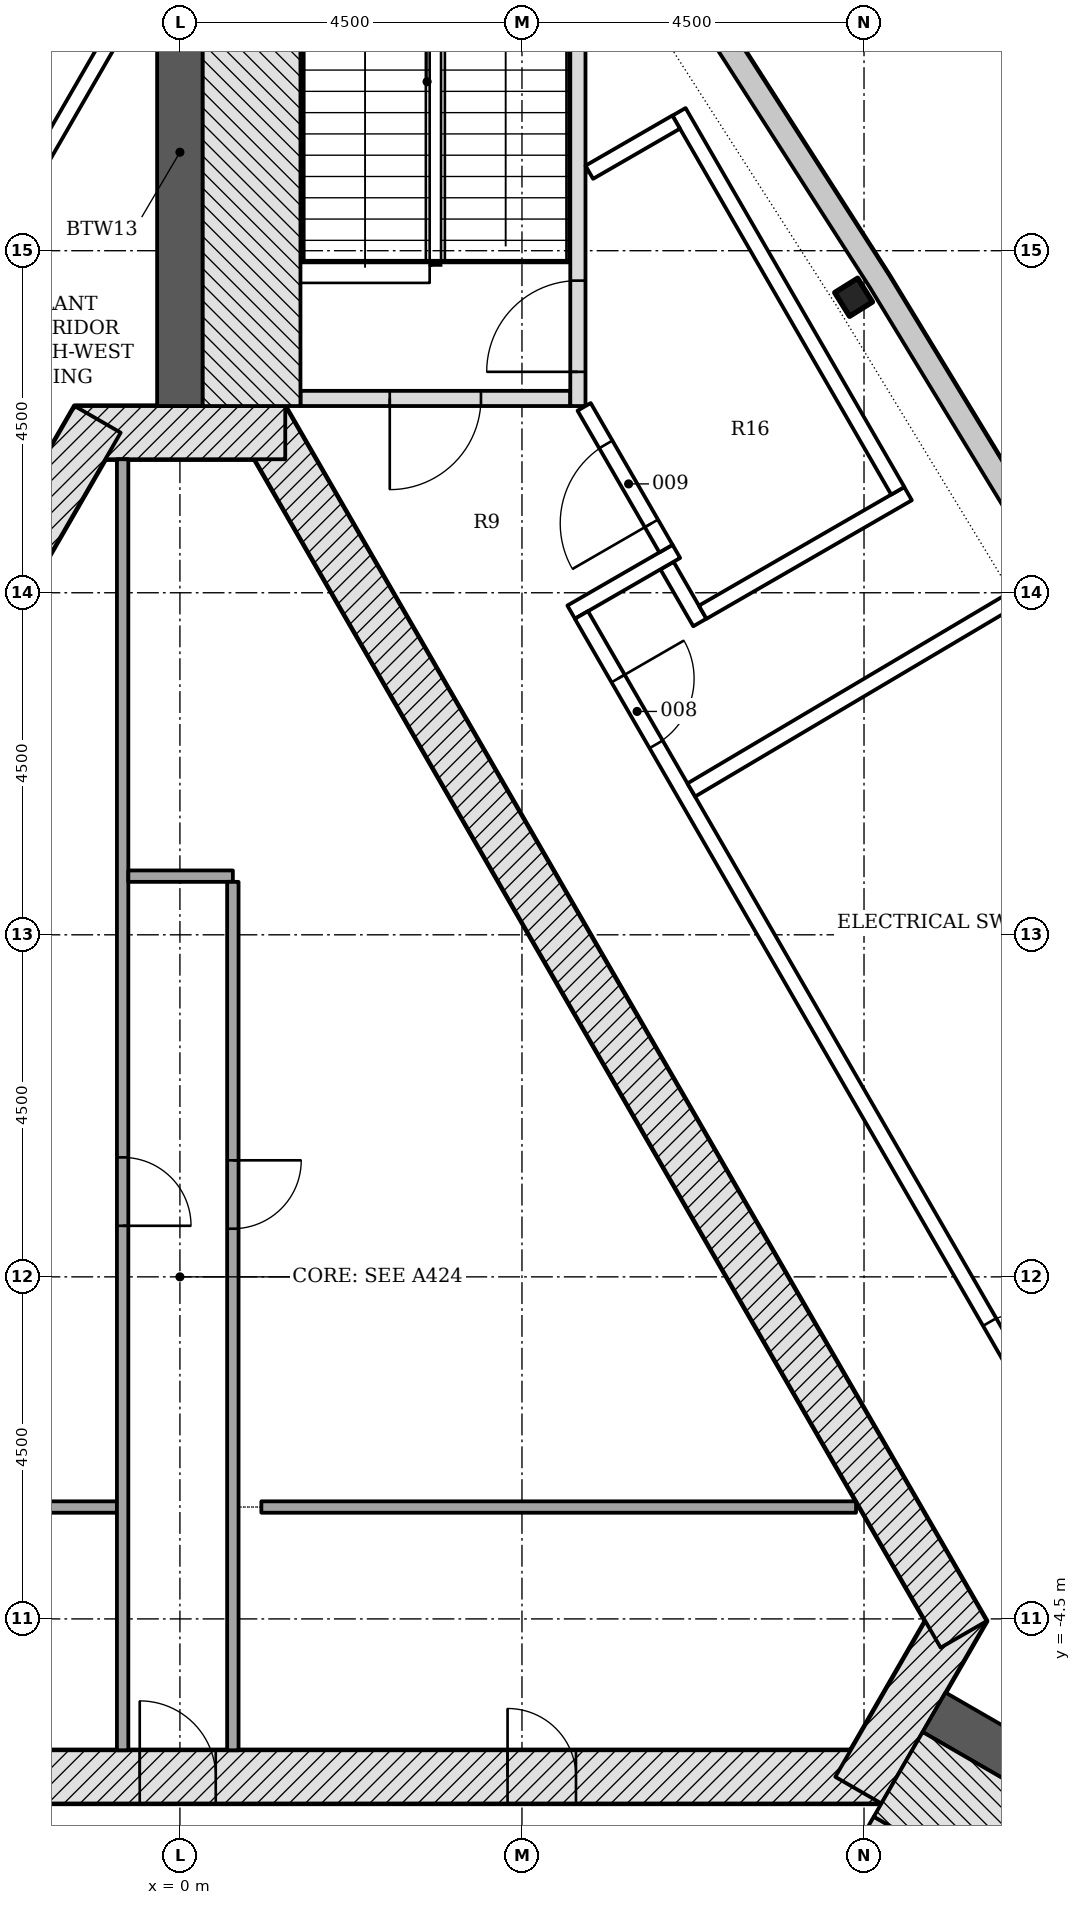
"""IFC4 building model, lengths in metres.
Left out: names, types, materials, properties, quantities, classifications, styles, units other than length and angle.
Written with IfcOpenShell. Run it as: python <this file> out.ifc"""

import sys

from ifc_helpers import new_model, si_unit, direction, frame, frame_2d, origin, origin_2d, place, context, subcontext, project, spatial, polyline, rectangle, i_section, outline, extrude, element, fill, save


model = new_model("IFC4")
c1 = context("Model", 3, precision=1e-05, world=origin(), true_north=direction((0.0, 1.0)))
c2 = subcontext(c1, "Body", "Model", "MODEL_VIEW")
j1 = project(units=[si_unit("LENGTHUNIT", "METRE"), si_unit("PLANEANGLEUNIT", "RADIAN")], contexts=[c1])
p1 = place(None, origin())
s1 = spatial("IfcSite", under=j1, at=p1, CompositionType="ELEMENT")
p2 = place(p1, origin())
s2 = spatial("IfcBuilding", under=s1, at=p2, CompositionType="ELEMENT")
p3 = place(p2, frame((0.0, 0.0, 279.6)))
s3 = spatial("IfcBuildingStorey", under=s2, at=p3, CompositionType="ELEMENT", Elevation=279.6)
p4 = place(p3, frame((-9.229, -6.578, -0.25), z_axis=(0.0, 0.0, 1.0), x_axis=(1.0, 0.0, 0.0)))
e1 = element("IfcWall", 1, at=p4, inside=s3, PredefinedType="SHEAR", context=c2, shape_type="SweptSolid", body=[
    extrude(rectangle(XDim=18.458, YDim=0.7, at=frame_2d((9.229, 0.0))), origin(), (0.0, 0.0, 1.0), 4.5),
])
p5 = place(p4, frame((8.7, 0.0, 0.25)))
e2 = element("IfcOpeningElement", 2, at=p5, cuts=e1, PredefinedType="OPENING", context=c2, shape_type="SweptSolid", body=[
    extrude(rectangle(XDim=1.0, YDim=2.1, at=frame_2d((0.5, 1.05))), frame((0.0, 0.36, 0.0), z_axis=(0.0, -1.0, 0.0), x_axis=(1.0, 0.0, 0.0)), (0.0, 0.0, 1.0), 0.72),
])
p6 = place(p4, frame((3.99, 0.0, 0.25)))
e3 = element("IfcOpeningElement", 3, at=p6, cuts=e1, PredefinedType="OPENING", context=c2, shape_type="SweptSolid", body=[
    extrude(rectangle(XDim=0.9, YDim=2.1, at=frame_2d((0.45, 1.05))), frame((0.0, 0.36, 0.0), z_axis=(0.0, -1.0, 0.0), x_axis=(1.0, 0.0, 0.0)), (0.0, 0.0, 1.0), 0.72),
])
p7 = place(p4, frame((13.539, 0.0, 0.25)))
e4 = element("IfcOpeningElement", 4, at=p7, cuts=e1, PredefinedType="OPENING", context=c2, shape_type="SweptSolid", body=[
    extrude(rectangle(XDim=0.9, YDim=2.1, at=frame_2d((0.45, 1.05))), frame((0.0, 0.36, 0.0), z_axis=(0.0, -1.0, 0.0), x_axis=(1.0, 0.0, 0.0)), (0.0, 0.0, 1.0), 0.72),
])
p8 = place(p3, frame((8.926, -6.753, -0.25), z_axis=(0.0, 0.0, 1.0), x_axis=(0.500042739161, 0.866000726912, 0.0)))
e5 = element("IfcWall", 5, at=p8, inside=s3, PredefinedType="SHEAR", context=c2, shape_type="SweptSolid", body=[
    extrude(rectangle(XDim=2.771, YDim=0.7, at=frame_2d((1.386, 0.0))), origin(), (0.0, 0.0, 1.0), 4.5),
])
p9 = place(p3, frame((10.311, -4.703, -0.25), z_axis=(0.0, 0.0, 1.0), x_axis=(-0.500001446645, 0.866024568562, 0.0)))
e6 = element("IfcWall", 6, at=p9, inside=s3, PredefinedType="SHEAR", context=c2, shape_type="SweptSolid", body=[
    extrude(rectangle(XDim=18.458, YDim=0.7, at=frame_2d((9.229, 0.0))), origin(), (0.0, 0.0, 1.0), 4.5),
])
p10 = place(p3, frame((1.386, 11.106, -0.25), z_axis=(0.0, 0.0, 1.0), x_axis=(-1.0, 0.0, 0.0)))
e7 = element("IfcWall", 7, at=p10, inside=s3, PredefinedType="SHEAR", context=c2, shape_type="SweptSolid", body=[
    extrude(rectangle(XDim=2.771, YDim=0.7, at=frame_2d((1.386, 0.0))), origin(), (0.0, 0.0, 1.0), 4.5),
])
p11 = place(p3, frame((-1.083, 11.281, -0.25), z_axis=(0.0, 0.0, 1.0), x_axis=(-0.500001446645, -0.866024568562, 0.0)))
e8 = element("IfcWall", 8, at=p11, inside=s3, PredefinedType="SHEAR", context=c2, shape_type="SweptSolid", body=[
    extrude(rectangle(XDim=18.458, YDim=0.7, at=frame_2d((9.229, 0.0))), origin(), (0.0, 0.0, 1.0), 4.5),
])
p12 = place(p11, frame((8.979, 0.0, 0.25)))
e9 = element("IfcOpeningElement", 9, at=p12, cuts=e8, PredefinedType="OPENING", context=c2, shape_type="SweptSolid", body=[
    extrude(rectangle(XDim=1.2, YDim=2.1, at=frame_2d((0.6, 1.05))), frame((0.0, 0.36, 0.0), z_axis=(0.0, -1.0, 0.0), x_axis=(1.0, 0.0, 0.0)), (0.0, 0.0, 1.0), 0.72),
])
p13 = place(p11, frame((11.029, 0.0, 0.25)))
e10 = element("IfcOpeningElement", 10, at=p13, cuts=e8, PredefinedType="OPENING", context=c2, shape_type="SweptSolid", body=[
    extrude(rectangle(XDim=1.2, YDim=2.1, at=frame_2d((0.6, 1.05))), frame((0.0, 0.36, 0.0), z_axis=(0.0, -1.0, 0.0), x_axis=(1.0, 0.0, 0.0)), (0.0, 0.0, 1.0), 0.72),
])
p14 = place(p3, frame((0.0, 11.456, -0.25), z_axis=(0.0, 0.0, 1.0), x_axis=(0.0, 1.0, 0.0)))
e11 = element("IfcWall", 11, at=p14, inside=s3, PredefinedType="SHEAR", context=c2, shape_type="SweptSolid", body=[
    extrude(rectangle(XDim=6.679, YDim=0.6, at=frame_2d((3.339, 0.0))), origin(), (0.0, 0.0, 1.0), 4.5),
])
p15 = place(p3, frame((9.922, -5.728, -0.25), z_axis=(0.0, 0.0, 1.0), x_axis=(0.866032176823, -0.499988268569, 0.0)))
e12 = element("IfcWall", 12, at=p15, inside=s3, PredefinedType="SHEAR", context=c2, shape_type="SweptSolid", body=[
    extrude(rectangle(XDim=6.678, YDim=0.6, at=frame_2d((3.339, 0.0))), origin(), (0.0, 0.0, 1.0), 4.5),
])
p16 = place(p3, frame((8.863, 12.888, -0.25), z_axis=(0.0, 0.0, 1.0), x_axis=(-0.529819164802, 0.84811063701, 0.0)))
e13 = element("IfcColumn", 13, at=p16, inside=s3, PredefinedType="COLUMN", context=c2, shape_type="SweptSolid", body=[
    extrude(i_section(OverallWidth=0.368, OverallDepth=0.356, WebThickness=0.011, FlangeThickness=0.018, FilletRadius=0.015, at=origin_2d()), origin(), (0.0, 0.0, 1.0), 4.5),
])
p17 = place(p3, origin())
e14 = element("IfcWall", 14, at=p17, inside=s3, PredefinedType="NOTDEFINED", context=c2, shape_type="SweptSolid", body=[
    extrude(outline(polyline([(11.669, 9.335), (9.33, 13.179), (6.901, 16.968), (6.649, 16.806), (9.075, 13.02), (11.413, 9.179), (11.669, 9.335)])), origin(), (0.0, 0.0, 1.0), 4.25),
])
p18 = place(p3, frame((-8.895, -3.028, 0.0), z_axis=(0.0, 0.0, 1.0), x_axis=(1.0, 0.0, 0.0)))
e15 = element("IfcWall", 15, at=p18, inside=s3, PredefinedType="PARTITIONING", context=c2, shape_type="SweptSolid", body=[
    extrude(rectangle(XDim=8.066, YDim=0.15, at=frame_2d((4.033, 0.0))), origin(), (0.0, 0.0, 1.0), 4.25),
])
p19 = place(p3, frame((-0.754, 10.756, 0.0), z_axis=(0.0, 0.0, 1.0), x_axis=(0.0, -1.0, 0.0)))
e16 = element("IfcWall", 16, at=p19, inside=s3, PredefinedType="PARTITIONING", context=c2, shape_type="SweptSolid", body=[
    extrude(rectangle(XDim=16.985, YDim=0.15, at=frame_2d((8.492, 0.0))), origin(), (0.0, 0.0, 1.0), 4.25),
])
p20 = place(p19, frame((9.185, 0.0, 0.0)))
e17 = element("IfcOpeningElement", 17, at=p20, cuts=e16, PredefinedType="OPENING", context=c2, shape_type="SweptSolid", body=[
    extrude(rectangle(XDim=0.9, YDim=2.1, at=frame_2d((0.45, 1.05))), frame((0.0, 0.085, 0.0), z_axis=(0.0, -1.0, 0.0), x_axis=(1.0, 0.0, 0.0)), (0.0, 0.0, 1.0), 0.17),
])
p21 = place(p3, frame((-0.679, 5.272, 0.0), z_axis=(0.0, 0.0, 1.0), x_axis=(1.0, 0.0, 0.0)))
e18 = element("IfcWall", 18, at=p21, inside=s3, PredefinedType="PARTITIONING", context=c2, shape_type="SweptSolid", body=[
    extrude(rectangle(XDim=1.375, YDim=0.15, at=frame_2d((0.688, 0.0))), origin(), (0.0, 0.0, 1.0), 4.25),
])
p22 = place(p3, frame((0.696, 5.197, 0.0), z_axis=(0.0, 0.0, 1.0), x_axis=(0.0, -1.0, 0.0)))
e19 = element("IfcWall", 19, at=p22, inside=s3, PredefinedType="PARTITIONING", context=c2, shape_type="SweptSolid", body=[
    extrude(rectangle(XDim=11.425, YDim=0.15, at=frame_2d((5.712, 0.0))), origin(), (0.0, 0.0, 1.0), 4.25),
])
p23 = place(p22, frame((3.664, 0.0, 0.0)))
e20 = element("IfcOpeningElement", 20, at=p23, cuts=e19, PredefinedType="OPENING", context=c2, shape_type="SweptSolid", body=[
    extrude(rectangle(XDim=0.9, YDim=2.1, at=frame_2d((0.45, 1.05))), frame((0.0, 0.085, 0.0), z_axis=(0.0, -1.0, 0.0), x_axis=(1.0, 0.0, 0.0)), (0.0, 0.0, 1.0), 0.17),
])
p24 = place(p3, frame((1.071, -3.028, 0.0), z_axis=(0.0, 0.0, 1.0), x_axis=(1.0, 0.0, 0.0)))
e21 = element("IfcWall", 21, at=p24, inside=s3, PredefinedType="PARTITIONING", context=c2, shape_type="SweptSolid", body=[
    extrude(rectangle(XDim=7.824, YDim=0.15, at=frame_2d((3.912, 0.0))), origin(), (0.0, 0.0, 1.0), 4.25),
])
p25 = place(p3, frame((5.135, 11.556, -0.25), z_axis=(0.0, 0.0, 1.0), x_axis=(-1.0, 0.0, 0.0)))
e22 = element("IfcWall", 22, at=p25, inside=s3, PredefinedType="SHEAR", context=c2, shape_type="SweptSolid", body=[
    extrude(rectangle(XDim=3.55, YDim=0.2, at=frame_2d((1.775, 0.0))), origin(), (0.0, 0.0, 1.0), 4.5),
])
p26 = place(p25, frame((1.175, 0.0, 0.25)))
e23 = element("IfcOpeningElement", 23, at=p26, cuts=e22, PredefinedType="OPENING", context=c2, shape_type="SweptSolid", body=[
    extrude(rectangle(XDim=1.2, YDim=2.1, at=frame_2d((0.6, 1.05))), frame((0.0, 0.11, 0.0), z_axis=(0.0, -1.0, 0.0), x_axis=(1.0, 0.0, 0.0)), (0.0, 0.0, 1.0), 0.22),
])
p27 = place(p3, frame((5.236, 11.456, -0.25), z_axis=(0.0, 0.0, 1.0), x_axis=(0.0, 1.0, 0.0)))
e24 = element("IfcWall", 24, at=p27, inside=s3, PredefinedType="SHEAR", context=c2, shape_type="SweptSolid", body=[
    extrude(rectangle(XDim=5.6, YDim=0.2, at=frame_2d((2.8, 0.0))), origin(), (0.0, 0.0, 1.0), 4.5),
])
p28 = place(p27, frame((0.45, 0.0, 0.25)))
e25 = element("IfcOpeningElement", 25, at=p28, cuts=e24, PredefinedType="OPENING", context=c2, shape_type="SweptSolid", body=[
    extrude(rectangle(XDim=1.2, YDim=2.1, at=frame_2d((0.6, 1.05))), frame((0.0, 0.11, 0.0), z_axis=(0.0, -1.0, 0.0), x_axis=(1.0, 0.0, 0.0)), (0.0, 0.0, 1.0), 0.22),
])
p29 = place(p3, frame((0.943, 11.456, -0.25), z_axis=(0.0, 0.0, 1.0), x_axis=(0.0, 1.0, 0.0)))
e26 = element("IfcWall", 26, at=p29, inside=s3, PredefinedType="SHEAR", context=c2, shape_type="SweptSolid", body=[
    extrude(rectangle(XDim=6.679, YDim=1.286, at=frame_2d((3.339, 0.0))), origin(), (0.0, 0.0, 1.0), 4.5),
])
p30 = place(p3, frame((7.44, -10.226, -0.25), z_axis=(0.0, 0.0, 1.0), x_axis=(0.500022077904, 0.866012656725, 0.0)))
e27 = element("IfcWall", 27, at=p30, inside=s3, PredefinedType="SHEAR", context=c2, shape_type="SweptSolid", body=[
    extrude(rectangle(XDim=3.55, YDim=0.2, at=frame_2d((1.775, 0.0))), origin(), (0.0, 0.0, 1.0), 4.5),
])
p31 = place(p30, frame((1.175, 0.0, 0.25)))
e28 = element("IfcOpeningElement", 28, at=p31, cuts=e27, PredefinedType="OPENING", context=c2, shape_type="SweptSolid", body=[
    extrude(rectangle(XDim=1.2, YDim=2.1, at=frame_2d((0.6, 1.05))), frame((0.0, 0.11, 0.0), z_axis=(0.0, -1.0, 0.0), x_axis=(1.0, 0.0, 0.0)), (0.0, 0.0, 1.0), 0.22),
])
p32 = place(p3, frame((9.45, -6.545, -0.25), z_axis=(0.0, 0.0, 1.0), x_axis=(0.866016347338, -0.500015685897, 0.0)))
e29 = element("IfcWall", 29, at=p32, inside=s3, PredefinedType="SHEAR", context=c2, shape_type="SweptSolid", body=[
    extrude(rectangle(XDim=6.678, YDim=1.286, at=frame_2d((3.339, 0.0))), origin(), (0.0, 0.0, 1.0), 4.5),
])
p33 = place(p3, frame((-7.307, 5.2, 0.0), z_axis=(0.0, 0.0, 1.0), x_axis=(0.49999780173, 0.866026672953, 0.0)))
e30 = element("IfcWall", 30, at=p33, inside=s3, PredefinedType="PARTITIONING", context=c2, shape_type="SweptSolid", body=[
    extrude(rectangle(XDim=13.841, YDim=0.2, at=frame_2d((6.92, 0.0))), origin(), (0.0, 0.0, 1.0), 3.702),
])
p34 = place(p33, frame((6.454, 0.0, 0.0)))
e31 = element("IfcOpeningElement", 31, at=p34, cuts=e30, PredefinedType="OPENING", context=c2, shape_type="SweptSolid", body=[
    extrude(rectangle(XDim=1.0, YDim=2.1, at=frame_2d((0.5, 1.05))), frame((0.0, 0.11, 0.0), z_axis=(0.0, -1.0, 0.0), x_axis=(1.0, 0.0, 0.0)), (0.0, 0.0, 1.0), 0.22),
])
p35 = place(p3, frame((6.408, 9.358, 0.0), z_axis=(0.0, 0.0, 1.0), x_axis=(0.49996696679, -0.866044474677, 0.0)))
e32 = element("IfcWall", 32, at=p35, inside=s3, PredefinedType="PARTITIONING", context=c2, shape_type="SweptSolid", body=[
    extrude(rectangle(XDim=0.864, YDim=0.2, at=frame_2d((0.432, 0.0))), origin(), (0.0, 0.0, 1.0), 4.25),
])
p36 = place(p3, frame((5.147, 8.745, 0.0), z_axis=(0.0, 0.0, 1.0), x_axis=(0.865987117328, 0.500066308224, 0.0)))
e33 = element("IfcWall", 33, at=p36, inside=s3, PredefinedType="PARTITIONING", context=c2, shape_type="SweptSolid", body=[
    extrude(rectangle(XDim=1.598, YDim=0.2, at=frame_2d((0.799, 0.0))), origin(), (0.0, 0.0, 1.0), 4.25),
])
p37 = place(p3, frame((6.395, 9.581, 0.0), z_axis=(0.0, 0.0, 1.0), x_axis=(-0.500003735859, 0.866023246874, 0.0)))
e34 = element("IfcWall", 34, at=p37, inside=s3, PredefinedType="PARTITIONING", context=c2, shape_type="SweptSolid", body=[
    extrude(rectangle(XDim=2.154, YDim=0.2, at=frame_2d((1.077, 0.0))), origin(), (0.0, 0.0, 1.0), 3.702),
])
p38 = place(p37, frame((0.383, 0.0, 0.0)))
e35 = element("IfcOpeningElement", 35, at=p38, cuts=e34, PredefinedType="OPENING", context=c2, shape_type="SweptSolid", body=[
    extrude(rectangle(XDim=1.2, YDim=2.1, at=frame_2d((0.6, 1.05))), frame((0.0, 0.11, 0.0), z_axis=(0.0, -1.0, 0.0), x_axis=(1.0, 0.0, 0.0)), (0.0, 0.0, 1.0), 0.22),
])
p39 = place(p3, frame((5.282, 8.708, 0.0), z_axis=(0.0, 0.0, 1.0), x_axis=(0.500001848211, -0.866024336717, 0.0)))
e36 = element("IfcWall", 36, at=p39, inside=s3, PredefinedType="PARTITIONING", context=c2, shape_type="SweptSolid", body=[
    extrude(rectangle(XDim=19.591, YDim=0.2, at=frame_2d((9.795, 0.0))), origin(), (0.0, 0.0, 1.0), 3.702),
])
p40 = place(p39, frame((10.741, 0.0, 0.0)))
e37 = element("IfcOpeningElement", 37, at=p40, cuts=e36, PredefinedType="OPENING", context=c2, shape_type="SweptSolid", body=[
    extrude(rectangle(XDim=1.0, YDim=2.1, at=frame_2d((0.5, 1.05))), frame((0.0, 0.11, 0.0), z_axis=(0.0, -1.0, 0.0), x_axis=(1.0, 0.0, 0.0)), (0.0, 0.0, 1.0), 0.22),
])
p41 = place(p39, frame((0.965, 0.0, 0.0)))
e38 = element("IfcOpeningElement", 38, at=p41, cuts=e36, PredefinedType="OPENING", context=c2, shape_type="SweptSolid", body=[
    extrude(rectangle(XDim=1.0, YDim=2.1, at=frame_2d((0.5, 1.05))), frame((0.0, 0.11, 0.0), z_axis=(0.0, -1.0, 0.0), x_axis=(1.0, 0.0, 0.0)), (0.0, 0.0, 1.0), 0.22),
])
p42 = place(p3, frame((6.728, 6.406, 0.0), z_axis=(0.0, 0.0, 1.0), x_axis=(0.860154706705, 0.510033215128, 0.0)))
e39 = element("IfcWall", 39, at=p42, inside=s3, PredefinedType="PARTITIONING", context=c2, shape_type="SweptSolid", body=[
    extrude(rectangle(XDim=5.044, YDim=0.2, at=frame_2d((2.522, 0.0))), origin(), (0.0, 0.0, 1.0), 3.702),
])
p43 = place(p3, frame((6.878, 8.744, 0.0), z_axis=(0.0, 0.0, 1.0), x_axis=(0.866023983177, 0.500002460556, 0.0)))
e40 = element("IfcWall", 40, at=p43, inside=s3, PredefinedType="PARTITIONING", context=c2, shape_type="SweptSolid", body=[
    extrude(rectangle(XDim=3.12, YDim=0.2, at=frame_2d((1.56, 0.0))), origin(), (0.0, 0.0, 1.0), 4.25),
])
p44 = place(p3, frame((6.566, 15.327, 0.0), z_axis=(0.0, 0.0, 1.0), x_axis=(0.499997778408, -0.866026686418, 0.0)))
e41 = element("IfcWall", 41, at=p44, inside=s3, PredefinedType="PARTITIONING", context=c2, shape_type="SweptSolid", body=[
    extrude(rectangle(XDim=5.757, YDim=0.2, at=frame_2d((2.878, 0.0))), origin(), (0.0, 0.0, 1.0), 3.702),
])
p45 = place(p3, frame((6.529, 15.192, 0.0), z_axis=(0.0, 0.0, 1.0), x_axis=(-0.866117824122, -0.499839889103, 0.0)))
e42 = element("IfcWall", 42, at=p45, inside=s3, PredefinedType="PARTITIONING", context=c2, shape_type="SweptSolid", body=[
    extrude(rectangle(XDim=1.32, YDim=0.2, at=frame_2d((0.66, 0.0))), origin(), (0.0, 0.0, 1.0), 4.25),
])
p46 = place(p5, origin())
e43 = element("IfcDoor", 43, at=p46, inside=s3, OperationType="SINGLE_SWING_LEFT", PredefinedType="DOOR", context=c2, shape_type="SweptSolid", body=[
    extrude(rectangle(XDim=1.0, YDim=2.1, at=frame_2d((0.5, 1.05))), frame((0.0, 0.075, 0.0), z_axis=(0.0, -1.0, 0.0), x_axis=(1.0, 0.0, 0.0)), (0.0, 0.0, 1.0), 0.15),
])
fill(e2, e43)
p47 = place(p7, origin())
e44 = element("IfcDoor", 44, at=p47, inside=s3, OperationType="SINGLE_SWING_LEFT", PredefinedType="DOOR", context=c2, shape_type="SweptSolid", body=[
    extrude(rectangle(XDim=0.9, YDim=2.1, at=frame_2d((0.45, 1.05))), frame((0.0, 0.075, 0.0), z_axis=(0.0, -1.0, 0.0), x_axis=(1.0, 0.0, 0.0)), (0.0, 0.0, 1.0), 0.15),
])
fill(e4, e44)
p48 = place(p20, origin())
e45 = element("IfcDoor", 45, at=p48, inside=s3, OperationType="SINGLE_SWING_RIGHT", PredefinedType="DOOR", context=c2, shape_type="SweptSolid", body=[
    extrude(rectangle(XDim=0.9, YDim=2.1, at=frame_2d((0.45, 1.05))), frame((0.0, 0.025, 0.0), z_axis=(0.0, -1.0, 0.0), x_axis=(1.0, 0.0, 0.0)), (0.0, 0.0, 1.0), 0.05),
])
fill(e17, e45)
p49 = place(p23, origin())
e46 = element("IfcDoor", 46, at=p49, inside=s3, OperationType="SINGLE_SWING_LEFT", PredefinedType="DOOR", context=c2, shape_type="SweptSolid", body=[
    extrude(rectangle(XDim=0.9, YDim=2.1, at=frame_2d((0.45, 1.05))), frame((0.0, 0.025, 0.0), z_axis=(0.0, -1.0, 0.0), x_axis=(1.0, 0.0, 0.0)), (0.0, 0.0, 1.0), 0.05),
])
fill(e20, e46)
p50 = place(p26, origin())
e47 = element("IfcDoor", 47, at=p50, inside=s3, OperationType="SINGLE_SWING_RIGHT", PredefinedType="DOOR", context=c2, shape_type="SweptSolid", body=[
    extrude(rectangle(XDim=1.2, YDim=2.1, at=frame_2d((0.6, 1.05))), frame((0.0, 0.025, 0.0), z_axis=(0.0, -1.0, 0.0), x_axis=(1.0, 0.0, 0.0)), (0.0, 0.0, 1.0), 0.05),
])
fill(e23, e47)
p51 = place(p28, origin())
e48 = element("IfcDoor", 48, at=p51, inside=s3, OperationType="SINGLE_SWING_LEFT", PredefinedType="DOOR", context=c2, shape_type="SweptSolid", body=[
    extrude(rectangle(XDim=1.2, YDim=2.1, at=frame_2d((0.6, 1.05))), frame((0.0, 0.025, 0.0), z_axis=(0.0, -1.0, 0.0), x_axis=(1.0, 0.0, 0.0)), (0.0, 0.0, 1.0), 0.05),
])
fill(e25, e48)
p52 = place(p40, origin())
e49 = element("IfcDoor", 49, at=p52, inside=s3, OperationType="SINGLE_SWING_RIGHT", PredefinedType="DOOR", context=c2, shape_type="SweptSolid", body=[
    extrude(rectangle(XDim=1.0, YDim=2.1, at=frame_2d((0.5, 1.05))), frame((0.0, 0.025, 0.0), z_axis=(0.0, -1.0, 0.0), x_axis=(1.0, 0.0, 0.0)), (0.0, 0.0, 1.0), 0.05),
])
fill(e37, e49)
p53 = place(p41, origin())
e50 = element("IfcDoor", 50, at=p53, inside=s3, OperationType="SINGLE_SWING_LEFT", PredefinedType="DOOR", context=c2, shape_type="SweptSolid", body=[
    extrude(rectangle(XDim=1.0, YDim=2.1, at=frame_2d((0.5, 1.05))), frame((0.0, 0.025, 0.0), z_axis=(0.0, -1.0, 0.0), x_axis=(1.0, 0.0, 0.0)), (0.0, 0.0, 1.0), 0.05),
])
fill(e38, e50)
p54 = place(p38, origin())
e51 = element("IfcDoor", 51, at=p54, inside=s3, OperationType="SINGLE_SWING_LEFT", PredefinedType="DOOR", context=c2, shape_type="SweptSolid", body=[
    extrude(rectangle(XDim=1.2, YDim=2.1, at=frame_2d((0.6, 1.05))), frame((0.0, 0.025, 0.0), z_axis=(0.0, -1.0, 0.0), x_axis=(1.0, 0.0, 0.0)), (0.0, 0.0, 1.0), 0.05),
])
fill(e35, e51)
save(model, sys.argv[1])
